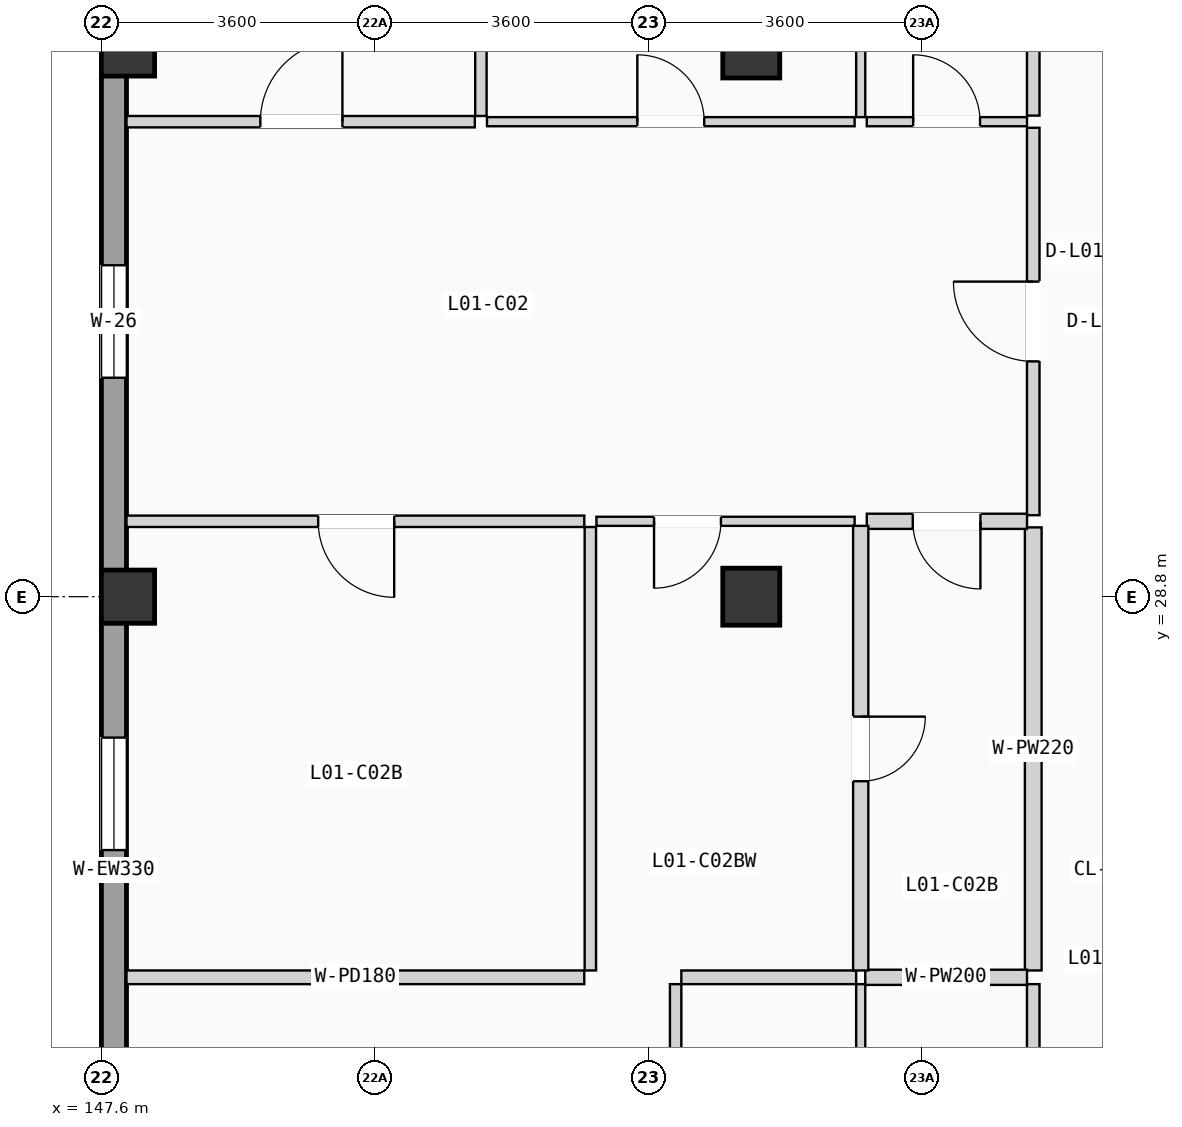
"""IFC4 building model, lengths in metres.
Left out: names, types, materials, properties, quantities, classifications, styles, units other than length and angle.
Written with IfcOpenShell. Run it as: python <this file> out.ifc"""

import sys

from ifc_helpers import new_model, si_unit, direction, frame, frame_2d, origin, origin_2d, place, context, subcontext, project, spatial, rectangle, extrude, element, fill, save


model = new_model("IFC4")
c1 = context("Model", 3, precision=1e-05, world=origin(), true_north=direction((0.0, 1.0)))
c2 = subcontext(c1, "Body", "Model", "MODEL_VIEW")
j1 = project(units=[si_unit("LENGTHUNIT", "METRE"), si_unit("PLANEANGLEUNIT", "RADIAN")], contexts=[c1])
p1 = place(None, origin())
s1 = spatial("IfcSite", under=j1, at=p1, CompositionType="ELEMENT")
p2 = place(p1, origin())
s2 = spatial("IfcBuilding", under=s1, at=p2, CompositionType="ELEMENT")
p3 = place(p2, frame((0.0, 0.0, 4.9)))
s3 = spatial("IfcBuildingStorey", under=s2, at=p3, CompositionType="ELEMENT", Elevation=4.9)
for number, where, z_axis, x_axis in (
    (1, (147.95, 28.8, 0.0), (0.0, 0.0, 1.0), (1.0, 0.0, 0.0)),
    (2, (147.95, 36.0, 0.0), (0.0, 0.0, 1.0), (1.0, 0.0, 0.0)),
):
    element("IfcColumn", number, at=place(p3, frame(where, z_axis=z_axis, x_axis=x_axis)), inside=s3, PredefinedType="COLUMN", context=c2, shape_type="SweptSolid", body=[
        extrude(rectangle(XDim=0.7, YDim=0.7, at=origin_2d()), origin(), (0.0, 0.0, 1.0), 3.675),
    ])
for number, where, z_axis, x_axis in (
    (3, (156.15, 28.8, 0.0), (0.0, 0.0, 1.0), (1.0, 0.0, 0.0)),
    (4, (156.15, 36.0, 0.0), (0.0, 0.0, 1.0), (1.0, 0.0, 0.0)),
):
    element("IfcColumn", number, at=place(p3, frame(where, z_axis=z_axis, x_axis=x_axis)), inside=s3, PredefinedType="COLUMN", context=c2, shape_type="SweptSolid", body=[
        extrude(rectangle(XDim=0.75, YDim=0.75, at=origin_2d()), origin(), (0.0, 0.0, 1.0), 3.675),
    ])
p4 = place(p3, frame((147.765, 0.33, 0.0), z_axis=(0.0, 0.0, 1.0), x_axis=(0.0, 1.0, 0.0)))
e5 = element("IfcWall", 5, at=p4, inside=s3, PredefinedType="SOLIDWALL", context=c2, shape_type="SweptSolid", body=[
    extrude(rectangle(XDim=49.74, YDim=0.33, at=frame_2d((24.87, 0.0))), origin(), (0.0, 0.0, 1.0), 3.415),
])
p5 = place(p4, frame((15.645, 0.0, 0.9)))
e6 = element("IfcOpeningElement", 6, at=p5, cuts=e5, PredefinedType="OPENING", context=c2, shape_type="SweptSolid", body=[
    extrude(rectangle(XDim=1.35, YDim=1.5, at=frame_2d((0.675, 0.75))), frame((0.0, 0.175, 0.0), z_axis=(0.0, -1.0, 0.0), x_axis=(1.0, 0.0, 0.0)), (0.0, 0.0, 1.0), 0.35),
])
p6 = place(p4, frame((9.051, 0.0, 0.9)))
e7 = element("IfcOpeningElement", 7, at=p6, cuts=e5, PredefinedType="OPENING", context=c2, shape_type="SweptSolid", body=[
    extrude(rectangle(XDim=1.35, YDim=1.65, at=frame_2d((0.675, 0.825))), frame((0.0, 0.175, 0.0), z_axis=(0.0, -1.0, 0.0), x_axis=(1.0, 0.0, 0.0)), (0.0, 0.0, 1.0), 0.35),
])
p7 = place(p4, frame((19.055, 0.0, 0.9)))
e8 = element("IfcOpeningElement", 8, at=p7, cuts=e5, PredefinedType="OPENING", context=c2, shape_type="SweptSolid", body=[
    extrude(rectangle(XDim=1.35, YDim=1.8, at=frame_2d((0.675, 0.9))), frame((0.0, 0.175, 0.0), z_axis=(0.0, -1.0, 0.0), x_axis=(1.0, 0.0, 0.0)), (0.0, 0.0, 1.0), 0.35),
])
p8 = place(p4, frame((31.351, 0.0, 0.9)))
e9 = element("IfcOpeningElement", 9, at=p8, cuts=e5, PredefinedType="OPENING", context=c2, shape_type="SweptSolid", body=[
    extrude(rectangle(XDim=1.48, YDim=1.2, at=frame_2d((0.74, 0.6))), frame((0.0, 0.175, 0.0), z_axis=(0.0, -1.0, 0.0), x_axis=(1.0, 0.0, 0.0)), (0.0, 0.0, 1.0), 0.35),
])
p9 = place(p4, frame((25.136, 0.0, 0.9)))
e10 = element("IfcOpeningElement", 10, at=p9, cuts=e5, PredefinedType="OPENING", context=c2, shape_type="SweptSolid", body=[
    extrude(rectangle(XDim=1.48, YDim=1.35, at=frame_2d((0.74, 0.675))), frame((0.0, 0.175, 0.0), z_axis=(0.0, -1.0, 0.0), x_axis=(1.0, 0.0, 0.0)), (0.0, 0.0, 1.0), 0.35),
])
p10 = place(p4, frame((38.465, 0.0, 0.9)))
e11 = element("IfcOpeningElement", 11, at=p10, cuts=e5, PredefinedType="OPENING", context=c2, shape_type="SweptSolid", body=[
    extrude(rectangle(XDim=1.48, YDim=1.5, at=frame_2d((0.74, 0.75))), frame((0.0, 0.175, 0.0), z_axis=(0.0, -1.0, 0.0), x_axis=(1.0, 0.0, 0.0)), (0.0, 0.0, 1.0), 0.35),
])
p11 = place(p3, frame((159.86, 18.79, 0.0), z_axis=(0.0, 0.0, 1.0), x_axis=(0.0, 1.0, 0.0)))
e12 = element("IfcWall", 12, at=p11, inside=s3, PredefinedType="PARTITIONING", context=c2, shape_type="SweptSolid", body=[
    extrude(rectangle(XDim=4.912, YDim=0.165, at=frame_2d((2.456, 0.0))), origin(), (0.0, 0.0, 1.0), 3.395),
])
p12 = place(p3, frame((159.86, 29.872, 0.0), z_axis=(0.0, 0.0, 1.0), x_axis=(0.0, 1.0, 0.0)))
e13 = element("IfcWall", 13, at=p12, inside=s3, PredefinedType="PARTITIONING", context=c2, shape_type="SweptSolid", body=[
    extrude(rectangle(XDim=5.098, YDim=0.165, at=frame_2d((2.549, 0.0))), origin(), (0.0, 0.0, 1.0), 3.395),
])
p13 = place(p12, frame((2.024, 0.0, 0.0)))
e14 = element("IfcOpeningElement", 14, at=p13, cuts=e13, PredefinedType="OPENING", context=c2, shape_type="SweptSolid", body=[
    extrude(rectangle(XDim=1.05, YDim=2.13, at=frame_2d((0.525, 1.065))), frame((0.0, 0.093, 0.0), z_axis=(0.0, -1.0, 0.0), x_axis=(1.0, 0.0, 0.0)), (0.0, 0.0, 1.0), 0.185),
])
p14 = place(p3, frame((159.86, 23.882, 0.0), z_axis=(0.0, 0.0, 1.0), x_axis=(0.0, 1.0, 0.0)))
e15 = element("IfcWall", 15, at=p14, inside=s3, PredefinedType="PLUMBINGWALL", context=c2, shape_type="SweptSolid", body=[
    extrude(rectangle(XDim=5.83, YDim=0.22, at=frame_2d((2.915, 0.0))), origin(), (0.0, 0.0, 1.0), 3.395),
])
p15 = place(p3, frame((159.86, 35.13, 0.0), z_axis=(0.0, 0.0, 1.0), x_axis=(0.0, 1.0, 0.0)))
e16 = element("IfcWall", 16, at=p15, inside=s3, PredefinedType="PARTITIONING", context=c2, shape_type="SweptSolid", body=[
    extrude(rectangle(XDim=7.67, YDim=0.165, at=frame_2d((3.835, 0.0))), origin(), (0.0, 0.0, 1.0), 3.395),
])
p16 = place(p3, frame((157.59, 18.77, 0.0), z_axis=(0.0, 0.0, 1.0), x_axis=(0.0, 1.0, 0.0)))
e17 = element("IfcWall", 17, at=p16, inside=s3, PredefinedType="PARTITIONING", context=c2, shape_type="SweptSolid", body=[
    extrude(rectangle(XDim=4.932, YDim=0.12, at=frame_2d((2.466, 0.0))), origin(), (0.0, 0.0, 1.0), 3.395),
])
p17 = place(p3, frame((157.65, 23.792, 0.0), z_axis=(0.0, 0.0, 1.0), x_axis=(1.0, 0.0, 0.0)))
e18 = element("IfcWall", 18, at=p17, inside=s3, PredefinedType="PLUMBINGWALL", context=c2, shape_type="SweptSolid", body=[
    extrude(rectangle(XDim=2.128, YDim=0.2, at=frame_2d((1.064, 0.0))), origin(), (0.0, 0.0, 1.0), 3.395),
])
p18 = place(p3, frame((155.155, 18.77, 0.0), z_axis=(0.0, 0.0, 1.0), x_axis=(0.0, 1.0, 0.0)))
e19 = element("IfcWall", 19, at=p18, inside=s3, PredefinedType="PARTITIONING", context=c2, shape_type="SweptSolid", body=[
    extrude(rectangle(XDim=4.932, YDim=0.15, at=frame_2d((2.466, 0.0))), origin(), (0.0, 0.0, 1.0), 3.395),
])
p19 = place(p3, frame((147.93, 23.792, 0.0), z_axis=(0.0, 0.0, 1.0), x_axis=(1.0, 0.0, 0.0)))
e20 = element("IfcWall", 20, at=p19, inside=s3, PredefinedType="PARTITIONING", context=c2, shape_type="SweptSolid", body=[
    extrude(rectangle(XDim=6.023, YDim=0.18, at=frame_2d((3.011, 0.0))), origin(), (0.0, 0.0, 1.0), 3.395),
])
p20 = place(p3, frame((155.23, 23.792, 0.0), z_axis=(0.0, 0.0, 1.0), x_axis=(1.0, 0.0, 0.0)))
e21 = element("IfcWall", 21, at=p20, inside=s3, PredefinedType="PARTITIONING", context=c2, shape_type="SweptSolid", body=[
    extrude(rectangle(XDim=2.3, YDim=0.18, at=frame_2d((1.15, 0.0))), origin(), (0.0, 0.0, 1.0), 3.395),
])
p21 = place(p3, frame((157.67, 29.792, 0.0), z_axis=(0.0, 0.0, 1.0), x_axis=(1.0, 0.0, 0.0)))
e22 = element("IfcWall", 22, at=p21, inside=s3, PredefinedType="PLUMBINGWALL", context=c2, shape_type="SweptSolid", body=[
    extrude(rectangle(XDim=2.108, YDim=0.2, at=frame_2d((1.054, 0.0))), origin(), (0.0, 0.0, 1.0), 3.395),
])
p22 = place(p21, frame((0.605, 0.0, 0.0)))
e23 = element("IfcOpeningElement", 23, at=p22, cuts=e22, PredefinedType="OPENING", context=c2, shape_type="SweptSolid", body=[
    extrude(rectangle(XDim=0.89, YDim=2.03, at=frame_2d((0.445, 1.015))), frame((0.0, 0.11, 0.0), z_axis=(0.0, -1.0, 0.0), x_axis=(1.0, 0.0, 0.0)), (0.0, 0.0, 1.0), 0.22),
])
p23 = place(p3, frame((157.67, 35.05, 0.0), z_axis=(0.0, 0.0, 1.0), x_axis=(1.0, 0.0, 0.0)))
e24 = element("IfcWall", 24, at=p23, inside=s3, PredefinedType="PARTITIONING", context=c2, shape_type="SweptSolid", body=[
    extrude(rectangle(XDim=2.108, YDim=0.12, at=frame_2d((1.054, 0.0))), origin(), (0.0, 0.0, 1.0), 3.395),
])
p24 = place(p23, frame((0.61, 0.0, 0.0)))
e25 = element("IfcOpeningElement", 25, at=p24, cuts=e24, PredefinedType="OPENING", context=c2, shape_type="SweptSolid", body=[
    extrude(rectangle(XDim=0.88, YDim=2.02, at=frame_2d((0.44, 1.01))), frame((0.0, 0.07, 0.0), z_axis=(0.0, -1.0, 0.0), x_axis=(1.0, 0.0, 0.0)), (0.0, 0.0, 1.0), 0.14),
])
p25 = place(p3, frame((147.93, 29.792, 0.0), z_axis=(0.0, 0.0, 1.0), x_axis=(1.0, 0.0, 0.0)))
e26 = element("IfcWall", 26, at=p25, inside=s3, PredefinedType="PARTITIONING", context=c2, shape_type="SweptSolid", body=[
    extrude(rectangle(XDim=6.023, YDim=0.15, at=frame_2d((3.011, 0.0))), origin(), (0.0, 0.0, 1.0), 3.395),
])
p26 = place(p25, frame((2.522, 0.0, 0.0)))
e27 = element("IfcOpeningElement", 27, at=p26, cuts=e26, PredefinedType="OPENING", context=c2, shape_type="SweptSolid", body=[
    extrude(rectangle(XDim=1.0, YDim=2.06, at=frame_2d((0.5, 1.03))), frame((0.0, 0.085, 0.0), z_axis=(0.0, -1.0, 0.0), x_axis=(1.0, 0.0, 0.0)), (0.0, 0.0, 1.0), 0.17),
])
p27 = place(p3, frame((154.113, 29.792, 0.0), z_axis=(0.0, 0.0, 1.0), x_axis=(1.0, 0.0, 0.0)))
e28 = element("IfcWall", 28, at=p27, inside=s3, PredefinedType="PARTITIONING", context=c2, shape_type="SweptSolid", body=[
    extrude(rectangle(XDim=3.397, YDim=0.12, at=frame_2d((1.698, 0.0))), origin(), (0.0, 0.0, 1.0), 3.395),
])
p28 = place(p27, frame((0.758, 0.0, 0.0)))
e29 = element("IfcOpeningElement", 29, at=p28, cuts=e28, PredefinedType="OPENING", context=c2, shape_type="SweptSolid", body=[
    extrude(rectangle(XDim=0.88, YDim=2.02, at=frame_2d((0.44, 1.01))), frame((0.0, 0.07, 0.0), z_axis=(0.0, -1.0, 0.0), x_axis=(1.0, 0.0, 0.0)), (0.0, 0.0, 1.0), 0.14),
])
p29 = place(p3, frame((147.93, 35.05, 0.0), z_axis=(0.0, 0.0, 1.0), x_axis=(1.0, 0.0, 0.0)))
e30 = element("IfcWall", 30, at=p29, inside=s3, PredefinedType="PARTITIONING", context=c2, shape_type="SweptSolid", body=[
    extrude(rectangle(XDim=4.583, YDim=0.15, at=frame_2d((2.292, 0.0))), origin(), (0.0, 0.0, 1.0), 3.395),
])
p30 = place(p29, frame((1.761, 0.0, 0.0)))
e31 = element("IfcOpeningElement", 31, at=p30, cuts=e30, PredefinedType="OPENING", context=c2, shape_type="SweptSolid", body=[
    extrude(rectangle(XDim=1.08, YDim=2.1, at=frame_2d((0.54, 1.05))), frame((0.0, 0.085, 0.0), z_axis=(0.0, -1.0, 0.0), x_axis=(1.0, 0.0, 0.0)), (0.0, 0.0, 1.0), 0.17),
])
p31 = place(p3, frame((152.673, 35.05, 0.0), z_axis=(0.0, 0.0, 1.0), x_axis=(1.0, 0.0, 0.0)))
e32 = element("IfcWall", 32, at=p31, inside=s3, PredefinedType="PARTITIONING", context=c2, shape_type="SweptSolid", body=[
    extrude(rectangle(XDim=4.837, YDim=0.12, at=frame_2d((2.418, 0.0))), origin(), (0.0, 0.0, 1.0), 3.395),
])
p32 = place(p31, frame((1.978, 0.0, 0.0)))
e33 = element("IfcOpeningElement", 33, at=p32, cuts=e32, PredefinedType="OPENING", context=c2, shape_type="SweptSolid", body=[
    extrude(rectangle(XDim=0.88, YDim=2.02, at=frame_2d((0.44, 1.01))), frame((0.0, 0.07, 0.0), z_axis=(0.0, -1.0, 0.0), x_axis=(1.0, 0.0, 0.0)), (0.0, 0.0, 1.0), 0.14),
])
p33 = place(p3, frame((157.59, 23.882, 0.0), z_axis=(0.0, 0.0, 1.0), x_axis=(0.0, 1.0, 0.0)))
e34 = element("IfcWall", 34, at=p33, inside=s3, PredefinedType="PLUMBINGWALL", context=c2, shape_type="SweptSolid", body=[
    extrude(rectangle(XDim=5.85, YDim=0.2, at=frame_2d((2.925, 0.0))), origin(), (0.0, 0.0, 1.0), 3.395),
])
p34 = place(p33, frame((2.49, 0.0, 0.0)))
e35 = element("IfcOpeningElement", 35, at=p34, cuts=e34, PredefinedType="OPENING", context=c2, shape_type="SweptSolid", body=[
    extrude(rectangle(XDim=0.85, YDim=2.01, at=frame_2d((0.425, 1.005))), frame((0.0, 0.11, 0.0), z_axis=(0.0, -1.0, 0.0), x_axis=(1.0, 0.0, 0.0)), (0.0, 0.0, 1.0), 0.22),
])
p35 = place(p3, frame((157.59, 35.11, 0.0), z_axis=(0.0, 0.0, 1.0), x_axis=(0.0, 1.0, 0.0)))
e36 = element("IfcWall", 36, at=p35, inside=s3, PredefinedType="PARTITIONING", context=c2, shape_type="SweptSolid", body=[
    extrude(rectangle(XDim=7.69, YDim=0.12, at=frame_2d((3.845, 0.0))), origin(), (0.0, 0.0, 1.0), 3.395),
])
p36 = place(p3, frame((154.033, 23.882, 0.0), z_axis=(0.0, 0.0, 1.0), x_axis=(0.0, 1.0, 0.0)))
e37 = element("IfcWall", 37, at=p36, inside=s3, PredefinedType="PARTITIONING", context=c2, shape_type="SweptSolid", body=[
    extrude(rectangle(XDim=5.835, YDim=0.15, at=frame_2d((2.917, 0.0))), origin(), (0.0, 0.0, 1.0), 3.395),
])
p37 = place(p3, frame((152.593, 35.125, 0.0), z_axis=(0.0, 0.0, 1.0), x_axis=(0.0, 1.0, 0.0)))
e38 = element("IfcWall", 38, at=p37, inside=s3, PredefinedType="PARTITIONING", context=c2, shape_type="SweptSolid", body=[
    extrude(rectangle(XDim=7.675, YDim=0.15, at=frame_2d((3.837, 0.0))), origin(), (0.0, 0.0, 1.0), 3.395),
])
p38 = place(p8, origin())
e39 = element("IfcWindow", 39, at=p38, inside=s3, PartitioningType="SINGLE_PANEL", PredefinedType="WINDOW", context=c2, shape_type="SweptSolid", body=[
    extrude(rectangle(XDim=1.48, YDim=1.2, at=frame_2d((0.74, 0.6))), frame((0.0, 0.03, 0.0), z_axis=(0.0, -1.0, 0.0), x_axis=(1.0, 0.0, 0.0)), (0.0, 0.0, 1.0), 0.06),
])
fill(e9, e39)
p39 = place(p9, origin())
e40 = element("IfcWindow", 40, at=p39, inside=s3, PartitioningType="SINGLE_PANEL", PredefinedType="WINDOW", context=c2, shape_type="SweptSolid", body=[
    extrude(rectangle(XDim=1.48, YDim=1.35, at=frame_2d((0.74, 0.675))), frame((0.0, 0.03, 0.0), z_axis=(0.0, -1.0, 0.0), x_axis=(1.0, 0.0, 0.0)), (0.0, 0.0, 1.0), 0.06),
])
fill(e10, e40)
p40 = place(p13, origin())
e41 = element("IfcDoor", 41, at=p40, inside=s3, OperationType="SINGLE_SWING_RIGHT", PredefinedType="DOOR", context=c2, shape_type="SweptSolid", body=[
    extrude(rectangle(XDim=1.05, YDim=2.13, at=frame_2d((0.525, 1.065))), frame((0.0, 0.025, 0.0), z_axis=(0.0, -1.0, 0.0), x_axis=(1.0, 0.0, 0.0)), (0.0, 0.0, 1.0), 0.05),
])
fill(e14, e41)
p41 = place(p22, frame((0.89, 0.0, 0.0), z_axis=(0.0, 0.0, 1.0), x_axis=(-1.0, 0.0, 0.0)))
e42 = element("IfcDoor", 42, at=p41, inside=s3, OperationType="SINGLE_SWING_RIGHT", PredefinedType="DOOR", context=c2, shape_type="SweptSolid", body=[
    extrude(rectangle(XDim=0.89, YDim=2.03, at=frame_2d((0.445, 1.015))), frame((0.0, 0.025, 0.0), z_axis=(0.0, -1.0, 0.0), x_axis=(1.0, 0.0, 0.0)), (0.0, 0.0, 1.0), 0.05),
])
fill(e23, e42)
p42 = place(p24, origin())
e43 = element("IfcDoor", 43, at=p42, inside=s3, OperationType="SINGLE_SWING_LEFT", PredefinedType="DOOR", context=c2, shape_type="SweptSolid", body=[
    extrude(rectangle(XDim=0.88, YDim=2.02, at=frame_2d((0.44, 1.01))), frame((0.0, 0.025, 0.0), z_axis=(0.0, -1.0, 0.0), x_axis=(1.0, 0.0, 0.0)), (0.0, 0.0, 1.0), 0.05),
])
fill(e25, e43)
p43 = place(p26, frame((1.0, 0.0, 0.0), z_axis=(0.0, 0.0, 1.0), x_axis=(-1.0, 0.0, 0.0)))
e44 = element("IfcDoor", 44, at=p43, inside=s3, OperationType="SINGLE_SWING_RIGHT", PredefinedType="DOOR", context=c2, shape_type="SweptSolid", body=[
    extrude(rectangle(XDim=1.0, YDim=2.06, at=frame_2d((0.5, 1.03))), frame((0.0, 0.025, 0.0), z_axis=(0.0, -1.0, 0.0), x_axis=(1.0, 0.0, 0.0)), (0.0, 0.0, 1.0), 0.05),
])
fill(e27, e44)
p44 = place(p28, frame((0.88, 0.0, 0.0), z_axis=(0.0, 0.0, 1.0), x_axis=(-1.0, 0.0, 0.0)))
e45 = element("IfcDoor", 45, at=p44, inside=s3, OperationType="SINGLE_SWING_LEFT", PredefinedType="DOOR", context=c2, shape_type="SweptSolid", body=[
    extrude(rectangle(XDim=0.88, YDim=2.02, at=frame_2d((0.44, 1.01))), frame((0.0, 0.025, 0.0), z_axis=(0.0, -1.0, 0.0), x_axis=(1.0, 0.0, 0.0)), (0.0, 0.0, 1.0), 0.05),
])
fill(e29, e45)
p45 = place(p30, origin())
e46 = element("IfcDoor", 46, at=p45, inside=s3, OperationType="SINGLE_SWING_RIGHT", PredefinedType="DOOR", context=c2, shape_type="SweptSolid", body=[
    extrude(rectangle(XDim=1.08, YDim=2.1, at=frame_2d((0.54, 1.05))), frame((0.0, 0.025, 0.0), z_axis=(0.0, -1.0, 0.0), x_axis=(1.0, 0.0, 0.0)), (0.0, 0.0, 1.0), 0.05),
])
fill(e31, e46)
p46 = place(p32, origin())
e47 = element("IfcDoor", 47, at=p46, inside=s3, OperationType="SINGLE_SWING_LEFT", PredefinedType="DOOR", context=c2, shape_type="SweptSolid", body=[
    extrude(rectangle(XDim=0.88, YDim=2.02, at=frame_2d((0.44, 1.01))), frame((0.0, 0.025, 0.0), z_axis=(0.0, -1.0, 0.0), x_axis=(1.0, 0.0, 0.0)), (0.0, 0.0, 1.0), 0.05),
])
fill(e33, e47)
p47 = place(p34, frame((0.85, 0.0, 0.0), z_axis=(0.0, 0.0, 1.0), x_axis=(-1.0, 0.0, 0.0)))
e48 = element("IfcDoor", 48, at=p47, inside=s3, OperationType="SINGLE_SWING_RIGHT", PredefinedType="DOOR", context=c2, shape_type="SweptSolid", body=[
    extrude(rectangle(XDim=0.85, YDim=2.01, at=frame_2d((0.425, 1.005))), frame((0.0, 0.025, 0.0), z_axis=(0.0, -1.0, 0.0), x_axis=(1.0, 0.0, 0.0)), (0.0, 0.0, 1.0), 0.05),
])
fill(e35, e48)
save(model, sys.argv[1])
